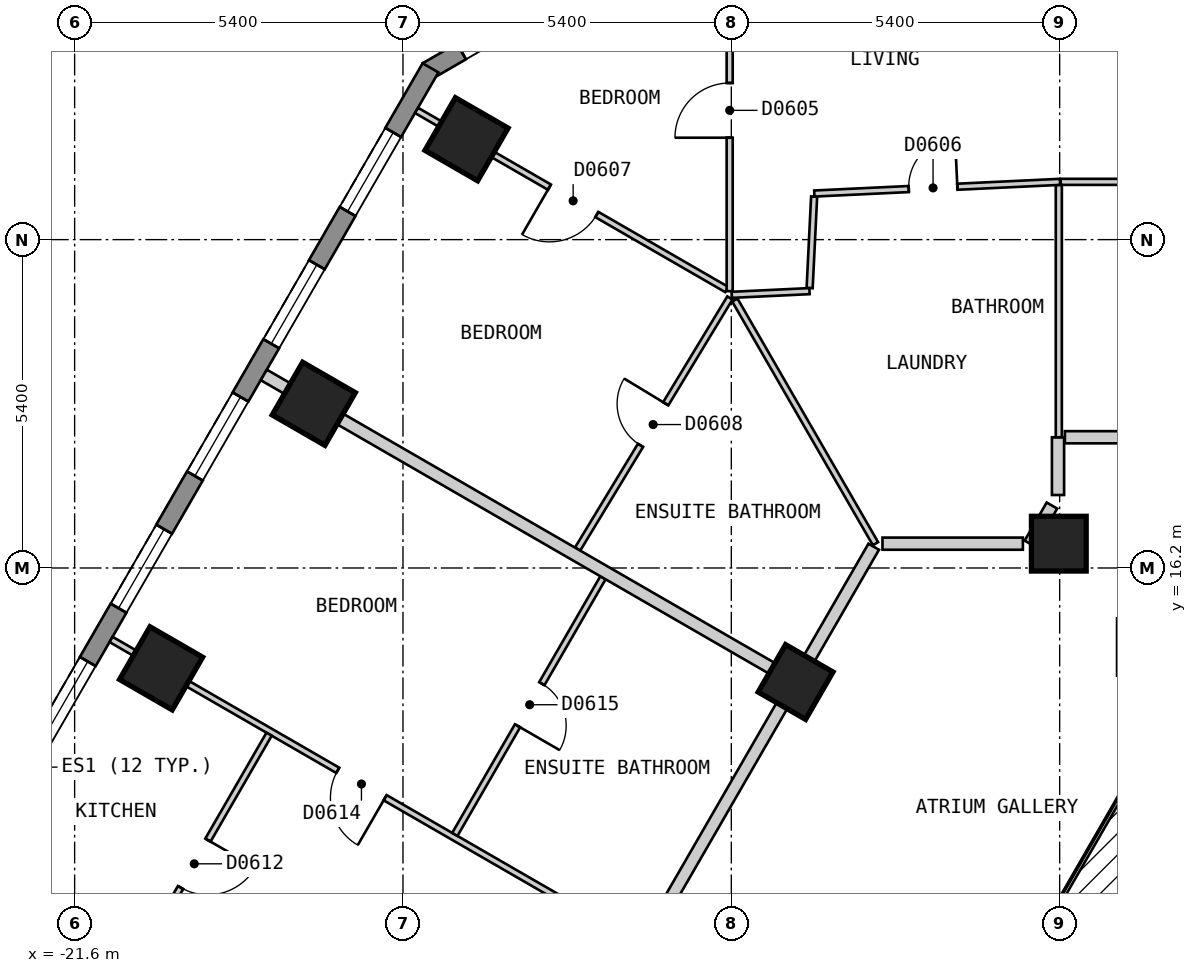
"""IFC4 building model, lengths in metres.
Left out: names, types, materials, properties, quantities, classifications, styles, units other than length and angle.
Written with IfcOpenShell. Run it as: python <this file> out.ifc"""

import sys

from ifc_helpers import new_model, si_unit, direction, frame, frame_2d, origin, origin_2d, place, context, subcontext, project, spatial, polyline, rectangle, outline, extrude, element, fill, save


model = new_model("IFC4")
c1 = context("Model", 3, precision=1e-05, world=origin(), true_north=direction((0.0, 1.0)))
c2 = subcontext(c1, "Body", "Model", "MODEL_VIEW")
j1 = project(units=[si_unit("LENGTHUNIT", "METRE"), si_unit("PLANEANGLEUNIT", "RADIAN")], contexts=[c1])
p1 = place(None, origin())
s1 = spatial("IfcSite", under=j1, at=p1, CompositionType="ELEMENT")
p2 = place(p1, origin())
s2 = spatial("IfcBuilding", under=s1, at=p2, CompositionType="ELEMENT")
p3 = place(p2, frame((0.0, 0.0, 81.0)))
s3 = spatial("IfcBuildingStorey", under=s2, at=p3, CompositionType="ELEMENT", Elevation=81.0)
for number, where, z_axis, x_axis in (
    (1, (-15.155, 23.251, 0.0), (0.0, 0.0, 1.0), (-0.5, -0.866, 0.0)),
    (2, (-17.667, 18.9, 0.0), (0.0, 0.0, 1.0), (-0.5, -0.866, 0.0)),
    (3, (-20.178, 14.55, 0.0), (0.0, 0.0, 1.0), (-0.5, -0.866, 0.0)),
):
    element("IfcColumn", number, at=place(p3, frame(where, z_axis=z_axis, x_axis=x_axis)), inside=s3, PredefinedType="COLUMN", context=c2, shape_type="SweptSolid", body=[
        extrude(rectangle(XDim=1.0, YDim=1.0, at=origin_2d()), origin(), (0.0, 0.0, 1.0), 3.0),
    ])
for number, where, z_axis, x_axis in (
    (4, (-5.414, 16.6, 0.0), (0.0, 0.0, 1.0), (-1.0, 0.0, 0.0)),
    (5, (-9.743, 14.325, 0.0), (0.0, 0.0, 1.0), (-0.5, -0.866, 0.0)),
):
    element("IfcColumn", number, at=place(p3, frame(where, z_axis=z_axis, x_axis=x_axis)), inside=s3, PredefinedType="COLUMN", context=c2, shape_type="SweptSolid", body=[
        extrude(rectangle(XDim=0.9, YDim=0.9, at=origin_2d()), origin(), (0.0, 0.0, 1.0), 3.0),
    ])
p4 = place(p3, frame((-11.472, 26.87, 0.0), z_axis=(0.0, 0.0, 1.0), x_axis=(-0.866022959057, -0.500004234368, 0.0)))
e6 = element("IfcWall", 6, at=p4, inside=s3, PredefinedType="SOLIDWALL", context=c2, shape_type="SweptSolid", body=[
    extrude(outline(polyline([(0.0, -0.15), (5.0, -0.15), (4.92, 0.15), (0.08, 0.15), (0.0, -0.15)])), origin(), (0.0, 0.0, 1.0), 2.7),
])
p5 = place(p4, frame((0.65, 0.0, 0.15)))
e7 = element("IfcOpeningElement", 7, at=p5, cuts=e6, PredefinedType="OPENING", context=c2, shape_type="SweptSolid", body=[
    extrude(rectangle(XDim=1.2, YDim=2.1, at=frame_2d((0.6, 1.05))), frame((0.0, 0.16, 0.0), z_axis=(0.0, -1.0, 0.0), x_axis=(1.0, 0.0, 0.0)), (0.0, 0.0, 1.0), 0.32),
])
p6 = place(p4, frame((3.149, 0.0, 0.15)))
e8 = element("IfcOpeningElement", 8, at=p6, cuts=e6, PredefinedType="OPENING", context=c2, shape_type="SweptSolid", body=[
    extrude(rectangle(XDim=1.2, YDim=2.1, at=frame_2d((0.6, 1.05))), frame((0.0, 0.16, 0.0), z_axis=(0.0, -1.0, 0.0), x_axis=(1.0, 0.0, 0.0)), (0.0, 0.0, 1.0), 0.32),
])
p7 = place(p3, frame((-15.747, 24.425, 0.0), z_axis=(0.0, 0.0, 1.0), x_axis=(-0.500027479704, -0.866009537788, 0.0)))
e9 = element("IfcWall", 9, at=p7, inside=s3, PredefinedType="SOLIDWALL", context=c2, shape_type="SweptSolid", body=[
    extrude(outline(polyline([(0.0, -0.15), (26.559, -0.15), (26.478, 0.15), (0.08, 0.15), (0.0, -0.15)])), origin(), (0.0, 0.0, 1.0), 2.7),
])
p8 = place(p7, frame((1.227, 0.0, 0.15)))
e10 = element("IfcOpeningElement", 10, at=p8, cuts=e9, PredefinedType="OPENING", context=c2, shape_type="SweptSolid", body=[
    extrude(rectangle(XDim=1.5, YDim=2.1, at=frame_2d((0.75, 1.05))), frame((0.0, 0.16, 0.0), z_axis=(0.0, -1.0, 0.0), x_axis=(1.0, 0.0, 0.0)), (0.0, 0.0, 1.0), 0.32),
])
p9 = place(p7, frame((3.739, 0.0, 0.15)))
e11 = element("IfcOpeningElement", 11, at=p9, cuts=e9, PredefinedType="OPENING", context=c2, shape_type="SweptSolid", body=[
    extrude(rectangle(XDim=1.5, YDim=2.1, at=frame_2d((0.75, 1.05))), frame((0.0, 0.16, 0.0), z_axis=(0.0, -1.0, 0.0), x_axis=(1.0, 0.0, 0.0)), (0.0, 0.0, 1.0), 0.32),
])
p10 = place(p7, frame((6.25, 0.0, 0.15)))
e12 = element("IfcOpeningElement", 12, at=p10, cuts=e9, PredefinedType="OPENING", context=c2, shape_type="SweptSolid", body=[
    extrude(rectangle(XDim=1.5, YDim=2.1, at=frame_2d((0.75, 1.05))), frame((0.0, 0.16, 0.0), z_axis=(0.0, -1.0, 0.0), x_axis=(1.0, 0.0, 0.0)), (0.0, 0.0, 1.0), 0.32),
])
p11 = place(p7, frame((8.761, 0.0, 0.15)))
e13 = element("IfcOpeningElement", 13, at=p11, cuts=e9, PredefinedType="OPENING", context=c2, shape_type="SweptSolid", body=[
    extrude(rectangle(XDim=1.5, YDim=2.1, at=frame_2d((0.75, 1.05))), frame((0.0, 0.16, 0.0), z_axis=(0.0, -1.0, 0.0), x_axis=(1.0, 0.0, 0.0)), (0.0, 0.0, 1.0), 0.32),
])
p12 = place(p7, frame((11.273, 0.0, 0.15)))
e14 = element("IfcOpeningElement", 14, at=p12, cuts=e9, PredefinedType="OPENING", context=c2, shape_type="SweptSolid", body=[
    extrude(rectangle(XDim=1.5, YDim=2.1, at=frame_2d((0.75, 1.05))), frame((0.0, 0.16, 0.0), z_axis=(0.0, -1.0, 0.0), x_axis=(1.0, 0.0, 0.0)), (0.0, 0.0, 1.0), 0.32),
])
p13 = place(p7, frame((13.785, 0.0, 0.15)))
e15 = element("IfcOpeningElement", 15, at=p13, cuts=e9, PredefinedType="OPENING", context=c2, shape_type="SweptSolid", body=[
    extrude(rectangle(XDim=1.5, YDim=2.1, at=frame_2d((0.75, 1.05))), frame((0.0, 0.16, 0.0), z_axis=(0.0, -1.0, 0.0), x_axis=(1.0, 0.0, 0.0)), (0.0, 0.0, 1.0), 0.32),
])
p14 = place(p7, frame((16.296, 0.0, 0.15)))
e16 = element("IfcOpeningElement", 16, at=p14, cuts=e9, PredefinedType="OPENING", context=c2, shape_type="SweptSolid", body=[
    extrude(rectangle(XDim=1.5, YDim=2.1, at=frame_2d((0.75, 1.05))), frame((0.0, 0.16, 0.0), z_axis=(0.0, -1.0, 0.0), x_axis=(1.0, 0.0, 0.0)), (0.0, 0.0, 1.0), 0.32),
])
p15 = place(p7, frame((18.807, 0.0, 0.15)))
e17 = element("IfcOpeningElement", 17, at=p15, cuts=e9, PredefinedType="OPENING", context=c2, shape_type="SweptSolid", body=[
    extrude(rectangle(XDim=1.5, YDim=2.1, at=frame_2d((0.75, 1.05))), frame((0.0, 0.16, 0.0), z_axis=(0.0, -1.0, 0.0), x_axis=(1.0, 0.0, 0.0)), (0.0, 0.0, 1.0), 0.32),
])
p16 = place(p7, frame((21.319, 0.0, 0.15)))
e18 = element("IfcOpeningElement", 18, at=p16, cuts=e9, PredefinedType="OPENING", context=c2, shape_type="SweptSolid", body=[
    extrude(rectangle(XDim=1.5, YDim=2.1, at=frame_2d((0.75, 1.05))), frame((0.0, 0.16, 0.0), z_axis=(0.0, -1.0, 0.0), x_axis=(1.0, 0.0, 0.0)), (0.0, 0.0, 1.0), 0.32),
])
p17 = place(p7, frame((23.831, 0.0, 0.15)))
e19 = element("IfcOpeningElement", 19, at=p17, cuts=e9, PredefinedType="OPENING", context=c2, shape_type="SweptSolid", body=[
    extrude(rectangle(XDim=1.5, YDim=2.1, at=frame_2d((0.75, 1.05))), frame((0.0, 0.16, 0.0), z_axis=(0.0, -1.0, 0.0), x_axis=(1.0, 0.0, 0.0)), (0.0, 0.0, 1.0), 0.32),
])
p18 = place(p3, frame((-8.314, 16.6, 0.0), z_axis=(0.0, 0.0, 1.0), x_axis=(1.0, 0.0, 0.0)))
e20 = element("IfcWall", 20, at=p18, inside=s3, PredefinedType="PARTITIONING", context=c2, shape_type="SweptSolid", body=[
    extrude(rectangle(XDim=2.309, YDim=0.2, at=frame_2d((1.155, 0.0))), origin(), (0.0, 0.0, 1.0), 2.7),
])
p19 = place(p3, frame((-5.314, 18.35, 0.0), z_axis=(0.0, 0.0, 1.0), x_axis=(1.0, 0.0, 0.0)))
e21 = element("IfcWall", 21, at=p19, inside=s3, PredefinedType="PARTITIONING", context=c2, shape_type="SweptSolid", body=[
    extrude(rectangle(XDim=6.834, YDim=0.2, at=frame_2d((3.417, 0.0))), origin(), (0.0, 0.0, 1.0), 2.7),
])
p20 = place(p19, frame((2.106, 0.0, 0.0)))
e22 = element("IfcOpeningElement", 22, at=p20, cuts=e21, PredefinedType="OPENING", context=c2, shape_type="SweptSolid", body=[
    extrude(rectangle(XDim=1.0, YDim=2.1, at=frame_2d((0.5, 1.05))), frame((0.0, 0.11, 0.0), z_axis=(0.0, -1.0, 0.0), x_axis=(1.0, 0.0, 0.0)), (0.0, 0.0, 1.0), 0.22),
])
p21 = place(p3, frame((-5.889, 16.6, 0.0), z_axis=(0.0, 0.0, 1.0), x_axis=(0.499839240638, 0.866118198353, 0.0)))
e23 = element("IfcWall", 23, at=p21, inside=s3, PredefinedType="PARTITIONING", context=c2, shape_type="SweptSolid", body=[
    extrude(rectangle(XDim=0.724, YDim=0.2, at=frame_2d((0.362, 0.0))), origin(), (0.0, 0.0, 1.0), 2.7),
])
p22 = place(p3, frame((-18.562, -0.951, 0.0), z_axis=(0.0, 0.0, 1.0), x_axis=(0.499992962407, 0.866029466902, 0.0)))
e24 = element("IfcWall", 24, at=p22, inside=s3, PredefinedType="PARTITIONING", context=c2, shape_type="SweptSolid", body=[
    extrude(rectangle(XDim=20.208, YDim=0.2, at=frame_2d((10.104, 0.0))), origin(), (0.0, 0.0, 1.0), 2.7),
])
p23 = place(p22, frame((9.604, 0.0, 0.0)))
e25 = element("IfcOpeningElement", 25, at=p23, cuts=e24, PredefinedType="OPENING", context=c2, shape_type="SweptSolid", body=[
    extrude(rectangle(XDim=1.0, YDim=2.1, at=frame_2d((0.5, 1.05))), frame((0.0, 0.11, 0.0), z_axis=(0.0, -1.0, 0.0), x_axis=(1.0, 0.0, 0.0)), (0.0, 0.0, 1.0), 0.22),
])
p24 = place(p3, frame((-5.427, 17.4, 0.0), z_axis=(0.0, 0.0, 1.0), x_axis=(0.0, 1.0, 0.0)))
e26 = element("IfcWall", 26, at=p24, inside=s3, PredefinedType="PARTITIONING", context=c2, shape_type="SweptSolid", body=[
    extrude(rectangle(XDim=0.95, YDim=0.2, at=frame_2d((0.475, 0.0))), origin(), (0.0, 0.0, 1.0), 2.7),
])
p25 = place(p3, frame((-10.742, 20.606, 0.0), z_axis=(0.0, 0.0, 1.0), x_axis=(0.50003312339, -0.866006279142, 0.0)))
e27 = element("IfcWall", 27, at=p25, inside=s3, PredefinedType="PARTITIONING", context=c2, shape_type="SweptSolid", body=[
    extrude(rectangle(XDim=4.626, YDim=0.1, at=frame_2d((2.313, 0.0))), origin(), (0.0, 0.0, 1.0), 2.7),
])
p26 = place(p3, frame((-15.977, 23.725, 0.0), z_axis=(0.0, 0.0, 1.0), x_axis=(0.866028213039, -0.499995134196, 0.0)))
e28 = element("IfcWall", 28, at=p26, inside=s3, PredefinedType="PARTITIONING", context=c2, shape_type="SweptSolid", body=[
    extrude(rectangle(XDim=5.89, YDim=0.1, at=frame_2d((2.945, 0.0))), origin(), (0.0, 0.0, 1.0), 2.7),
])
p27 = place(p26, frame((2.524, 0.0, 0.0)))
e29 = element("IfcOpeningElement", 29, at=p27, cuts=e28, PredefinedType="OPENING", context=c2, shape_type="SweptSolid", body=[
    extrude(rectangle(XDim=0.9, YDim=2.1, at=frame_2d((0.45, 1.05))), frame((0.0, 0.06, 0.0), z_axis=(0.0, -1.0, 0.0), x_axis=(1.0, 0.0, 0.0)), (0.0, 0.0, 1.0), 0.12),
])
p28 = place(p3, frame((-21.001, 15.025, 0.0), z_axis=(0.0, 0.0, 1.0), x_axis=(0.866016855193, -0.500014806302, 0.0)))
e30 = element("IfcWall", 30, at=p28, inside=s3, PredefinedType="PARTITIONING", context=c2, shape_type="SweptSolid", body=[
    extrude(rectangle(XDim=10.0, YDim=0.1, at=frame_2d((5.0, 0.0))), origin(), (0.0, 0.0, 1.0), 2.7),
])
p29 = place(p28, frame((4.305, 0.0, 0.0)))
e31 = element("IfcOpeningElement", 31, at=p29, cuts=e30, PredefinedType="OPENING", context=c2, shape_type="SweptSolid", body=[
    extrude(rectangle(XDim=0.9, YDim=2.1, at=frame_2d((0.45, 1.05))), frame((0.0, 0.06, 0.0), z_axis=(0.0, -1.0, 0.0), x_axis=(1.0, 0.0, 0.0)), (0.0, 0.0, 1.0), 0.12),
])
p30 = place(p3, frame((-5.384, 22.55, 0.0), z_axis=(0.0, 0.0, 1.0), x_axis=(1.0, 0.0, 0.0)))
e32 = element("IfcWall", 32, at=p30, inside=s3, PredefinedType="PARTITIONING", context=c2, shape_type="SweptSolid", body=[
    extrude(rectangle(XDim=5.283, YDim=0.1, at=frame_2d((2.642, 0.0))), origin(), (0.0, 0.0, 1.0), 2.7),
])
p31 = place(p30, frame((2.226, 0.0, 0.0)))
e33 = element("IfcOpeningElement", 33, at=p31, cuts=e32, PredefinedType="OPENING", context=c2, shape_type="SweptSolid", body=[
    extrude(rectangle(XDim=0.9, YDim=2.1, at=frame_2d((0.45, 1.05))), frame((0.0, 0.06, 0.0), z_axis=(0.0, -1.0, 0.0), x_axis=(1.0, 0.0, 0.0)), (0.0, 0.0, 1.0), 0.12),
])
p32 = place(p3, frame((-13.328, 16.511, 0.0), z_axis=(0.0, 0.0, 1.0), x_axis=(0.518570528669, 0.855034857065, 0.0)))
e34 = element("IfcWall", 34, at=p32, inside=s3, PredefinedType="PARTITIONING", context=c2, shape_type="SweptSolid", body=[
    extrude(rectangle(XDim=4.83, YDim=0.1, at=frame_2d((2.415, 0.0))), origin(), (0.0, 0.0, 1.0), 2.7),
])
p33 = place(p32, frame((1.995, 0.0, 0.0)))
e35 = element("IfcOpeningElement", 35, at=p33, cuts=e34, PredefinedType="OPENING", context=c2, shape_type="SweptSolid", body=[
    extrude(rectangle(XDim=0.8, YDim=2.1, at=frame_2d((0.4, 1.05))), frame((0.0, 0.06, 0.0), z_axis=(0.0, -1.0, 0.0), x_axis=(1.0, 0.0, 0.0)), (0.0, 0.0, 1.0), 0.12),
])
p34 = place(p3, frame((-15.347, 11.819, 0.0), z_axis=(0.0, 0.0, 1.0), x_axis=(0.499943653708, 0.866057932887, 0.0)))
e36 = element("IfcWall", 36, at=p34, inside=s3, PredefinedType="PARTITIONING", context=c2, shape_type="SweptSolid", body=[
    extrude(rectangle(XDim=4.873, YDim=0.1, at=frame_2d((2.436, 0.0))), origin(), (0.0, 0.0, 1.0), 2.7),
])
p35 = place(p34, frame((2.062, 0.0, 0.0)))
e37 = element("IfcOpeningElement", 37, at=p35, cuts=e36, PredefinedType="OPENING", context=c2, shape_type="SweptSolid", body=[
    extrude(rectangle(XDim=0.8, YDim=2.1, at=frame_2d((0.4, 1.05))), frame((0.0, 0.06, 0.0), z_axis=(0.0, -1.0, 0.0), x_axis=(1.0, 0.0, 0.0)), (0.0, 0.0, 1.0), 0.12),
])
p36 = place(p3, frame((-20.864, 9.203, 0.0), z_axis=(0.0, 0.0, 1.0), x_axis=(0.500000007376, 0.866025399526, 0.0)))
e38 = element("IfcWall", 38, at=p36, inside=s3, PredefinedType="PARTITIONING", context=c2, shape_type="SweptSolid", body=[
    extrude(rectangle(XDim=4.924, YDim=0.1, at=frame_2d((2.462, 0.0))), origin(), (0.0, 0.0, 1.0), 2.7),
])
p37 = place(p36, frame((2.012, 0.0, 0.0)))
e39 = element("IfcOpeningElement", 39, at=p37, cuts=e38, PredefinedType="OPENING", context=c2, shape_type="SweptSolid", body=[
    extrude(rectangle(XDim=0.9, YDim=2.1, at=frame_2d((0.45, 1.05))), frame((0.0, 0.06, 0.0), z_axis=(0.0, -1.0, 0.0), x_axis=(1.0, 0.0, 0.0)), (0.0, 0.0, 1.0), 0.12),
])
p38 = place(p3, frame((-9.512, 20.803, 0.0), z_axis=(0.0, 0.0, 1.0), x_axis=(0.049089165168, 0.998794400196, 0.0)))
e40 = element("IfcWall", 40, at=p38, inside=s3, PredefinedType="PARTITIONING", context=c2, shape_type="SweptSolid", body=[
    extrude(rectangle(XDim=1.507, YDim=0.1, at=frame_2d((0.753, 0.0))), origin(), (0.0, 0.0, 1.0), 2.7),
])
p39 = place(p3, frame((-5.414, 18.35, 0.0), z_axis=(0.0, 0.0, 1.0), x_axis=(0.0, 1.0, 0.0)))
e41 = element("IfcWall", 41, at=p39, inside=s3, PredefinedType="PARTITIONING", context=c2, shape_type="SweptSolid", body=[
    extrude(rectangle(XDim=4.15, YDim=0.1, at=frame_2d((2.075, 0.0))), origin(), (0.0, 0.0, 1.0), 2.7),
])
p40 = place(p3, frame((-10.827, 20.753, 0.0), z_axis=(0.0, 0.0, 1.0), x_axis=(0.0, 1.0, 0.0)))
e42 = element("IfcWall", 42, at=p40, inside=s3, PredefinedType="PARTITIONING", context=c2, shape_type="SweptSolid", body=[
    extrude(rectangle(XDim=5.947, YDim=0.1, at=frame_2d((2.974, 0.0))), origin(), (0.0, 0.0, 1.0), 2.7),
])
p41 = place(p40, frame((2.523, 0.0, 0.0)))
e43 = element("IfcOpeningElement", 43, at=p41, cuts=e42, PredefinedType="OPENING", context=c2, shape_type="SweptSolid", body=[
    extrude(rectangle(XDim=0.9, YDim=2.1, at=frame_2d((0.45, 1.05))), frame((0.0, 0.06, 0.0), z_axis=(0.0, -1.0, 0.0), x_axis=(1.0, 0.0, 0.0)), (0.0, 0.0, 1.0), 0.12),
])
p42 = place(p3, frame((-10.792, 20.692, 0.0), z_axis=(0.0, 0.0, 1.0), x_axis=(0.998861653202, 0.04770112957, 0.0)))
e44 = element("IfcWall", 44, at=p42, inside=s3, PredefinedType="PARTITIONING", context=c2, shape_type="SweptSolid", body=[
    extrude(rectangle(XDim=1.28, YDim=0.1, at=frame_2d((0.64, 0.0))), origin(), (0.0, 0.0, 1.0), 2.7),
])
p43 = place(p3, frame((-9.435, 22.358, 0.0), z_axis=(0.0, 0.0, 1.0), x_axis=(0.998871548472, 0.04749346959, 0.0)))
e45 = element("IfcWall", 45, at=p43, inside=s3, PredefinedType="PARTITIONING", context=c2, shape_type="SweptSolid", body=[
    extrude(rectangle(XDim=4.046, YDim=0.1, at=frame_2d((2.023, 0.0))), origin(), (0.0, 0.0, 1.0), 2.7),
])
p44 = place(p43, frame((1.555, 0.0, 0.0)))
e46 = element("IfcOpeningElement", 46, at=p44, cuts=e45, PredefinedType="OPENING", context=c2, shape_type="SweptSolid", body=[
    extrude(rectangle(XDim=0.8, YDim=2.1, at=frame_2d((0.4, 1.05))), frame((0.0, 0.06, 0.0), z_axis=(0.0, -1.0, 0.0), x_axis=(1.0, 0.0, 0.0)), (0.0, 0.0, 1.0), 0.12),
])
p45 = place(p3, frame((-18.489, 19.375, 0.0), z_axis=(0.0, 0.0, 1.0), x_axis=(0.866016855193, -0.500014806302, 0.0)))
e47 = element("IfcWall", 47, at=p45, inside=s3, PredefinedType="PARTITIONING", context=c2, shape_type="SweptSolid", body=[
    extrude(rectangle(XDim=10.0, YDim=0.2, at=frame_2d((5.0, 0.0))), origin(), (0.0, 0.0, 1.0), 2.7),
])
p46 = place(p6, origin())
e48 = element("IfcWindow", 48, at=p46, inside=s3, PartitioningType="SINGLE_PANEL", PredefinedType="WINDOW", context=c2, shape_type="SweptSolid", body=[
    extrude(rectangle(XDim=1.2, YDim=2.1, at=frame_2d((0.6, 1.05))), frame((0.0, 0.03, 0.0), z_axis=(0.0, -1.0, 0.0), x_axis=(1.0, 0.0, 0.0)), (0.0, 0.0, 1.0), 0.06),
])
fill(e8, e48)
p47 = place(p8, origin())
e49 = element("IfcWindow", 49, at=p47, inside=s3, PartitioningType="SINGLE_PANEL", PredefinedType="WINDOW", context=c2, shape_type="SweptSolid", body=[
    extrude(rectangle(XDim=1.5, YDim=2.1, at=frame_2d((0.75, 1.05))), frame((0.0, 0.03, 0.0), z_axis=(0.0, -1.0, 0.0), x_axis=(1.0, 0.0, 0.0)), (0.0, 0.0, 1.0), 0.06),
])
fill(e10, e49)
p48 = place(p9, origin())
e50 = element("IfcWindow", 50, at=p48, inside=s3, PartitioningType="SINGLE_PANEL", PredefinedType="WINDOW", context=c2, shape_type="SweptSolid", body=[
    extrude(rectangle(XDim=1.5, YDim=2.1, at=frame_2d((0.75, 1.05))), frame((0.0, 0.03, 0.0), z_axis=(0.0, -1.0, 0.0), x_axis=(1.0, 0.0, 0.0)), (0.0, 0.0, 1.0), 0.06),
])
fill(e11, e50)
p49 = place(p10, origin())
e51 = element("IfcWindow", 51, at=p49, inside=s3, PartitioningType="SINGLE_PANEL", PredefinedType="WINDOW", context=c2, shape_type="SweptSolid", body=[
    extrude(rectangle(XDim=1.5, YDim=2.1, at=frame_2d((0.75, 1.05))), frame((0.0, 0.03, 0.0), z_axis=(0.0, -1.0, 0.0), x_axis=(1.0, 0.0, 0.0)), (0.0, 0.0, 1.0), 0.06),
])
fill(e12, e51)
p50 = place(p11, origin())
e52 = element("IfcWindow", 52, at=p50, inside=s3, PartitioningType="SINGLE_PANEL", PredefinedType="WINDOW", context=c2, shape_type="SweptSolid", body=[
    extrude(rectangle(XDim=1.5, YDim=2.1, at=frame_2d((0.75, 1.05))), frame((0.0, 0.03, 0.0), z_axis=(0.0, -1.0, 0.0), x_axis=(1.0, 0.0, 0.0)), (0.0, 0.0, 1.0), 0.06),
])
fill(e13, e52)
p51 = place(p12, origin())
e53 = element("IfcWindow", 53, at=p51, inside=s3, PartitioningType="SINGLE_PANEL", PredefinedType="WINDOW", context=c2, shape_type="SweptSolid", body=[
    extrude(rectangle(XDim=1.5, YDim=2.1, at=frame_2d((0.75, 1.05))), frame((0.0, 0.03, 0.0), z_axis=(0.0, -1.0, 0.0), x_axis=(1.0, 0.0, 0.0)), (0.0, 0.0, 1.0), 0.06),
])
fill(e14, e53)
p52 = place(p41, origin())
e54 = element("IfcDoor", 54, at=p52, inside=s3, OperationType="SINGLE_SWING_LEFT", PredefinedType="DOOR", context=c2, shape_type="SweptSolid", body=[
    extrude(rectangle(XDim=0.9, YDim=2.1, at=frame_2d((0.45, 1.05))), frame((0.0, 0.025, 0.0), z_axis=(0.0, -1.0, 0.0), x_axis=(1.0, 0.0, 0.0)), (0.0, 0.0, 1.0), 0.05),
])
fill(e43, e54)
p53 = place(p44, origin())
e55 = element("IfcDoor", 55, at=p53, inside=s3, OperationType="SINGLE_SWING_RIGHT", PredefinedType="DOOR", context=c2, shape_type="SweptSolid", body=[
    extrude(rectangle(XDim=0.8, YDim=2.1, at=frame_2d((0.4, 1.05))), frame((0.0, 0.025, 0.0), z_axis=(0.0, -1.0, 0.0), x_axis=(1.0, 0.0, 0.0)), (0.0, 0.0, 1.0), 0.05),
])
fill(e46, e55)
p54 = place(p27, origin())
e56 = element("IfcDoor", 56, at=p54, inside=s3, OperationType="SINGLE_SWING_LEFT", PredefinedType="DOOR", context=c2, shape_type="SweptSolid", body=[
    extrude(rectangle(XDim=0.9, YDim=2.1, at=frame_2d((0.45, 1.05))), frame((0.0, 0.025, 0.0), z_axis=(0.0, -1.0, 0.0), x_axis=(1.0, 0.0, 0.0)), (0.0, 0.0, 1.0), 0.05),
])
fill(e29, e56)
p55 = place(p33, origin())
e57 = element("IfcDoor", 57, at=p55, inside=s3, OperationType="SINGLE_SWING_RIGHT", PredefinedType="DOOR", context=c2, shape_type="SweptSolid", body=[
    extrude(rectangle(XDim=0.8, YDim=2.1, at=frame_2d((0.4, 1.05))), frame((0.0, 0.025, 0.0), z_axis=(0.0, -1.0, 0.0), x_axis=(1.0, 0.0, 0.0)), (0.0, 0.0, 1.0), 0.05),
])
fill(e35, e57)
p56 = place(p37, origin())
e58 = element("IfcDoor", 58, at=p56, inside=s3, OperationType="SINGLE_SWING_RIGHT", PredefinedType="DOOR", context=c2, shape_type="SweptSolid", body=[
    extrude(rectangle(XDim=0.9, YDim=2.1, at=frame_2d((0.45, 1.05))), frame((0.0, 0.025, 0.0), z_axis=(0.0, -1.0, 0.0), x_axis=(1.0, 0.0, 0.0)), (0.0, 0.0, 1.0), 0.05),
])
fill(e39, e58)
p57 = place(p29, origin())
e59 = element("IfcDoor", 59, at=p57, inside=s3, OperationType="SINGLE_SWING_RIGHT", PredefinedType="DOOR", context=c2, shape_type="SweptSolid", body=[
    extrude(rectangle(XDim=0.9, YDim=2.1, at=frame_2d((0.45, 1.05))), frame((0.0, 0.025, 0.0), z_axis=(0.0, -1.0, 0.0), x_axis=(1.0, 0.0, 0.0)), (0.0, 0.0, 1.0), 0.05),
])
fill(e31, e59)
p58 = place(p35, origin())
e60 = element("IfcDoor", 60, at=p58, inside=s3, OperationType="SINGLE_SWING_LEFT", PredefinedType="DOOR", context=c2, shape_type="SweptSolid", body=[
    extrude(rectangle(XDim=0.8, YDim=2.1, at=frame_2d((0.4, 1.05))), frame((0.0, 0.025, 0.0), z_axis=(0.0, -1.0, 0.0), x_axis=(1.0, 0.0, 0.0)), (0.0, 0.0, 1.0), 0.05),
])
fill(e37, e60)
save(model, sys.argv[1])
